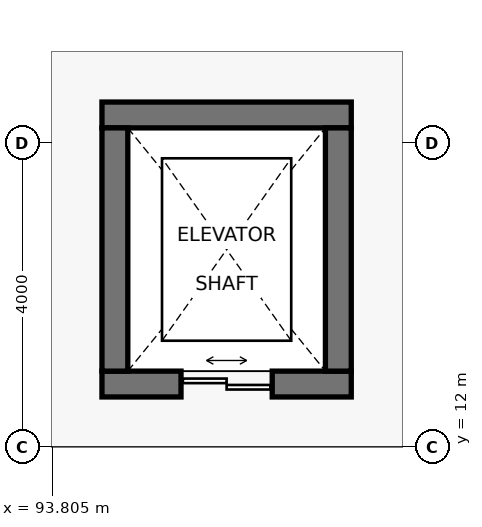
"""IFC4 building model, lengths in metres.
Left out: names, types, materials, properties, quantities, classifications, styles, units other than length and angle.
Written with IfcOpenShell. Run it as: python <this file> out.ifc"""

import sys

from ifc_helpers import new_model, si_unit, direction, frame, frame_2d, origin, place, context, subcontext, project, spatial, rectangle, extrude, element, fill, save


model = new_model("IFC4")
c1 = context("Model", 3, precision=1e-05, world=origin(), true_north=direction((0.0, 1.0)))
c2 = subcontext(c1, "Body", "Model", "MODEL_VIEW")
j1 = project(units=[si_unit("LENGTHUNIT", "METRE"), si_unit("PLANEANGLEUNIT", "RADIAN")], contexts=[c1])
p1 = place(None, origin())
s1 = spatial("IfcSite", under=j1, at=p1, CompositionType="ELEMENT")
p2 = place(p1, origin())
s2 = spatial("IfcBuilding", under=s1, at=p2, CompositionType="ELEMENT")
p3 = place(p2, frame((0.0, 0.0, 6.6)))
s3 = spatial("IfcBuildingStorey", under=s2, at=p3, CompositionType="ELEMENT", Elevation=6.6)
p4 = place(p3, frame((94.46, 12.83, 0.0), z_axis=(0.0, 0.0, 1.0), x_axis=(1.0, 0.0, 0.0)))
e1 = element("IfcWall", 1, at=p4, inside=s3, PredefinedType="SHEAR", context=c2, shape_type="SweptSolid", body=[
    extrude(rectangle(XDim=3.28, YDim=0.34, at=frame_2d((1.64, 0.0))), origin(), (0.0, 0.0, 1.0), 4.54),
])
p5 = place(p4, frame((1.04, 0.0, 0.0)))
e2 = element("IfcOpeningElement", 2, at=p5, cuts=e1, PredefinedType="OPENING", context=c2, shape_type="SweptSolid", body=[
    extrude(rectangle(XDim=1.2, YDim=2.2, at=frame_2d((0.6, 1.1))), frame((0.0, 0.185, 0.0), z_axis=(0.0, -1.0, 0.0), x_axis=(1.0, 0.0, 0.0)), (0.0, 0.0, 1.0), 0.37),
])
p6 = place(p3, frame((97.74, 16.37, 0.0), z_axis=(0.0, 0.0, 1.0), x_axis=(-1.0, 0.0, 0.0)))
e3 = element("IfcWall", 3, at=p6, inside=s3, PredefinedType="SHEAR", context=c2, shape_type="SweptSolid", body=[
    extrude(rectangle(XDim=3.28, YDim=0.34, at=frame_2d((1.64, 0.0))), origin(), (0.0, 0.0, 1.0), 4.54),
])
for number, where, z_axis, x_axis in (
    (4, (94.63, 16.2, 0.0), (0.0, 0.0, 1.0), (0.0, -1.0, 0.0)),
    (5, (97.57, 13.0, 0.0), (0.0, 0.0, 1.0), (0.0, 1.0, 0.0)),
):
    element("IfcWall", number, at=place(p3, frame(where, z_axis=z_axis, x_axis=x_axis)), inside=s3, PredefinedType="SHEAR", context=c2, shape_type="SweptSolid", body=[
        extrude(rectangle(XDim=3.2, YDim=0.34, at=frame_2d((1.6, 0.0))), origin(), (0.0, 0.0, 1.0), 4.54),
    ])
p7 = place(p5, origin())
e6 = element("IfcDoor", 6, at=p7, inside=s3, OperationType="DOUBLE_DOOR_SLIDING", PredefinedType="DOOR", context=c2, shape_type="SweptSolid", body=[
    extrude(rectangle(XDim=1.2, YDim=2.2, at=frame_2d((0.6, 1.1))), frame((0.0, 0.025, 0.0), z_axis=(0.0, -1.0, 0.0), x_axis=(1.0, 0.0, 0.0)), (0.0, 0.0, 1.0), 0.05),
])
fill(e2, e6)
save(model, sys.argv[1])
